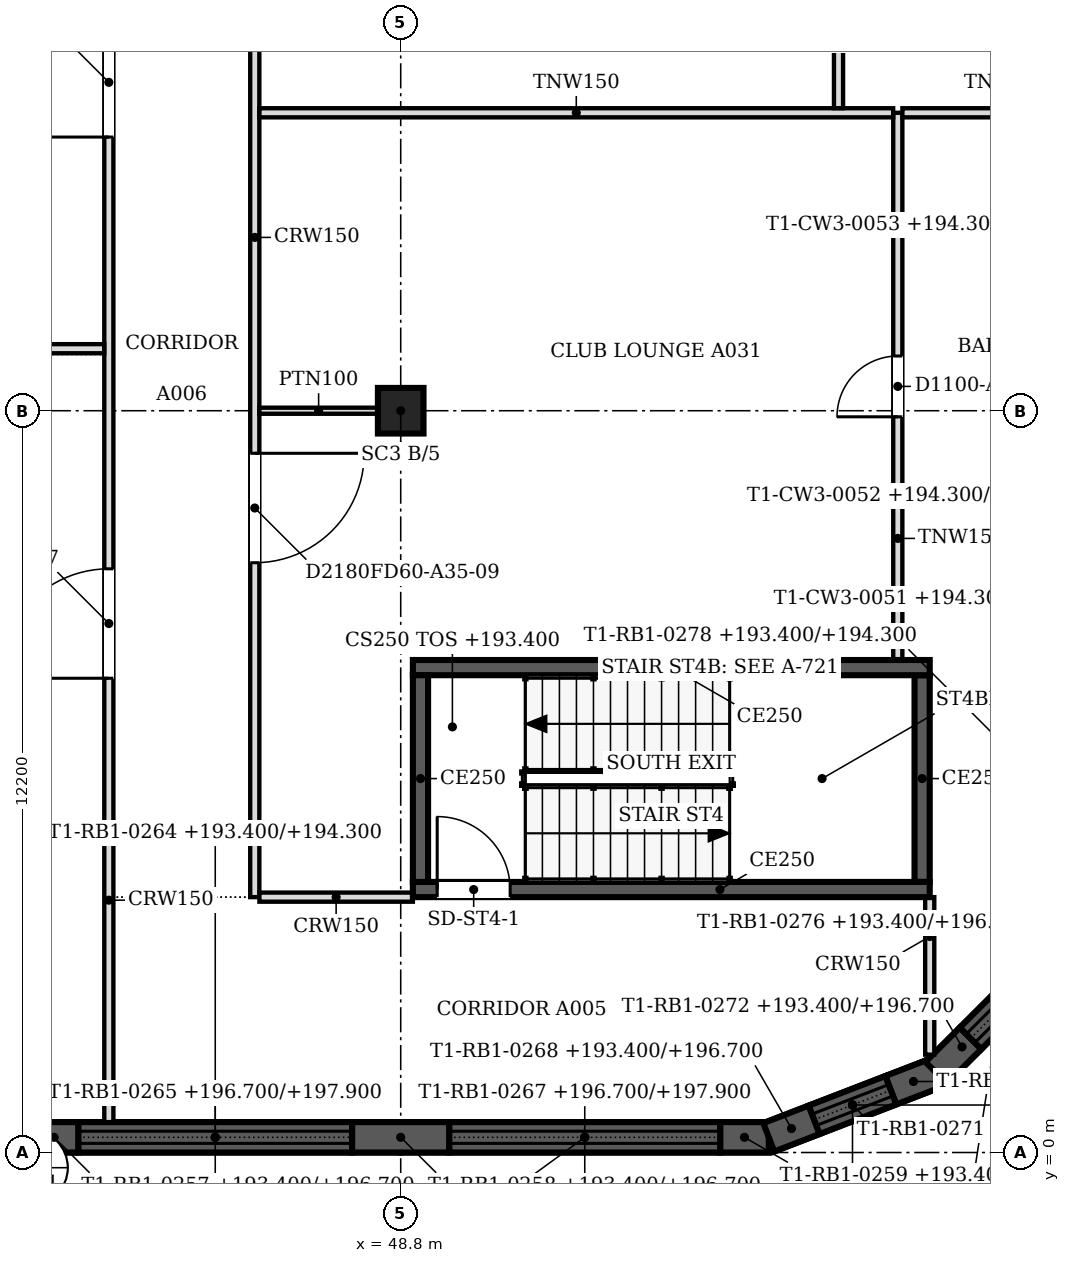
"""IFC4 building model, lengths in metres.
Left out: names, types, materials, properties, quantities, classifications, styles, units other than length and angle.
Written with IfcOpenShell. Run it as: python <this file> out.ifc"""

import sys

from ifc_helpers import new_model, si_unit, direction, frame, frame_2d, origin, origin_2d, place, context, subcontext, project, spatial, polyline, rectangle, outline, extrude, faceted_brep, source, transform, mapped, element, fill, save


model = new_model("IFC4")
c1 = context("Model", 3, precision=1e-05, world=origin(), true_north=direction((0.0, 1.0)))
c2 = subcontext(c1, "Body", "Model", "MODEL_VIEW")
j1 = project(units=[si_unit("LENGTHUNIT", "METRE"), si_unit("PLANEANGLEUNIT", "RADIAN")], contexts=[c1])
p1 = place(None, origin())
s1 = spatial("IfcSite", under=j1, at=p1, CompositionType="ELEMENT")
p2 = place(p1, origin())
s2 = spatial("IfcBuilding", under=s1, at=p2, CompositionType="ELEMENT")
p3 = place(p2, frame((0.0, 0.0, 193.4)))
s3 = spatial("IfcBuildingStorey", under=s2, at=p3, CompositionType="ELEMENT", Elevation=193.4)
p4 = place(p3, frame((48.8, 12.2, 0.0), z_axis=(0.0, 0.0, 1.0), x_axis=(1.0, 0.0, 0.0)))
e1 = element("IfcColumn", 1, at=p4, inside=s3, PredefinedType="COLUMN", context=c2, shape_type="SweptSolid", body=[
    extrude(rectangle(XDim=0.75, YDim=0.75, at=origin_2d()), origin(), (0.0, 0.0, 1.0), 4.3),
])
m1 = source(origin(), c2, "Body", "SweptSolid", [
    extrude(outline(polyline([(0.0, 0.0), (1.6, 0.0), (1.6, 3.3), (0.0, 3.3), (0.0, 0.0)])), frame((0.0, 0.25, 0.0), z_axis=(0.0, -1.0, 0.0), x_axis=(1.0, 0.0, 0.0)), (0.0, 0.0, 1.0), 0.5),
])
for number, where, z_axis, x_axis in (
    (2, (41.9, 0.25, 0.0), (0.0, 0.0, 1.0), (1.0, 0.0, 0.0)),
    (3, (48.0, 0.25, 0.0), (0.0, 0.0, 1.0), (1.0, 0.0, 0.0)),
):
    element("IfcWall", number, at=place(p3, frame(where, z_axis=z_axis, x_axis=x_axis)), inside=s3, PredefinedType="SOLIDWALL", context=c2, shape_type="MappedRepresentation", body=[
        mapped(m1, transform((0.0, 0.0, 0.0), scale=1.0)),
    ])
m2 = source(origin(), c2, "Body", "Brep", [
    faceted_brep([(0.0, -0.25, 0.0), (0.8, -0.25, 0.0), (0.8, -0.25, 3.3), (0.0, -0.25, 3.3), (0.0, 0.25, 3.3), (0.753, 0.25, 3.3), (0.753, 0.25, 0.0), (0.0, 0.25, 0.0), (0.8, -0.0, 0.0), (0.8, -0.0, 3.3)], [[[0, 1, 2, 3]], [[4, 5, 6, 7]], [[7, 6, 8, 1, 0]], [[9, 2, 1, 8]], [[5, 4, 3, 2, 9]], [[4, 7, 0, 3]], [[8, 6, 5, 9]]]),
])
p5 = place(p3, frame((54.053, 0.25, 0.0), z_axis=(0.0, 0.0, 1.0), x_axis=(1.0, 0.0, 0.0)))
e4 = element("IfcWall", 4, at=p5, inside=s3, PredefinedType="SOLIDWALL", context=c2, shape_type="MappedRepresentation", body=[
    mapped(m2, transform((0.0, 0.0, 0.0), scale=1.0)),
])
m3 = source(origin(), c2, "Body", "SweptSolid", [
    extrude(outline(polyline([(0.0, 0.0), (4.5, 0.0), (4.5, 0.9), (0.0, 0.9), (0.0, 0.0)])), frame((0.0, 0.25, 0.0), z_axis=(0.0, -1.0, 0.0), x_axis=(1.0, 0.0, 0.0)), (0.0, 0.0, 1.0), 0.5),
])
p6 = place(p3, frame((43.5, 0.25, 0.0), z_axis=(0.0, 0.0, 1.0), x_axis=(1.0, 0.0, 0.0)))
e5 = element("IfcWall", 5, at=p6, inside=s3, PredefinedType="SOLIDWALL", context=c2, shape_type="MappedRepresentation", body=[
    mapped(m3, transform((0.0, 0.0, 0.0), scale=1.0)),
])
m4 = source(origin(), c2, "Body", "SweptSolid", [
    extrude(outline(polyline([(0.0, 0.0), (6.1, 0.0), (6.1, 1.2), (0.0, 1.2), (0.0, 0.0)])), frame((0.0, 0.25, 0.0), z_axis=(0.0, -1.0, 0.0), x_axis=(1.0, 0.0, 0.0)), (0.0, 0.0, 1.0), 0.5),
])
p7 = place(p3, frame((42.7, 0.25, 3.3), z_axis=(0.0, 0.0, 1.0), x_axis=(1.0, 0.0, 0.0)))
e6 = element("IfcWall", 6, at=p7, inside=s3, PredefinedType="SOLIDWALL", context=c2, shape_type="MappedRepresentation", body=[
    mapped(m4, transform((0.0, 0.0, 0.0), scale=1.0)),
])
m5 = source(origin(), c2, "Body", "SweptSolid", [
    extrude(outline(polyline([(0.0, 0.0), (4.453, 0.0), (4.453, 0.9), (0.0, 0.9), (0.0, 0.0)])), frame((0.0, 0.25, 0.0), z_axis=(0.0, -1.0, 0.0), x_axis=(1.0, 0.0, 0.0)), (0.0, 0.0, 1.0), 0.5),
])
p8 = place(p3, frame((49.6, 0.25, 0.0), z_axis=(0.0, 0.0, 1.0), x_axis=(1.0, 0.0, 0.0)))
e7 = element("IfcWall", 7, at=p8, inside=s3, PredefinedType="SOLIDWALL", context=c2, shape_type="MappedRepresentation", body=[
    mapped(m5, transform((0.0, 0.0, 0.0), scale=1.0)),
])
m6 = source(origin(), c2, "Body", "Brep", [
    faceted_brep([(0.0, -0.25, 0.0), (6.053, -0.25, 0.0), (6.053, -0.25, 1.2), (0.0, -0.25, 1.2), (0.0, 0.25, 1.2), (6.007, 0.25, 1.2), (6.007, 0.25, 0.0), (0.0, 0.25, 0.0), (6.053, 0.0, 0.0), (6.053, 0.0, 1.2)], [[[0, 1, 2, 3]], [[4, 5, 6, 7]], [[7, 6, 8, 1, 0]], [[9, 2, 1, 8]], [[5, 4, 3, 2, 9]], [[4, 7, 0, 3]], [[8, 6, 5, 9]]]),
])
p9 = place(p3, frame((48.8, 0.25, 3.3), z_axis=(0.0, 0.0, 1.0), x_axis=(1.0, 0.0, 0.0)))
e8 = element("IfcWall", 8, at=p9, inside=s3, PredefinedType="SOLIDWALL", context=c2, shape_type="MappedRepresentation", body=[
    mapped(m6, transform((0.0, 0.0, 0.0), scale=1.0)),
])
m7 = source(origin(), c2, "Body", "Brep", [
    faceted_brep([(0.0, -0.25, 0.0), (0.8, -0.25, 0.0), (0.8, -0.25, 3.3), (0.0, -0.25, 3.3), (0.047, 0.25, 3.3), (0.8, 0.25, 3.3), (0.8, 0.25, 0.0), (0.047, 0.25, 0.0), (0.0, 0.0, 0.0), (0.0, 0.0, 3.3)], [[[0, 1, 2, 3]], [[4, 5, 6, 7]], [[7, 6, 1, 0, 8]], [[5, 4, 9, 3, 2]], [[8, 0, 3, 9]], [[7, 8, 9, 4]], [[1, 6, 5, 2]]]),
])
p10 = place(p3, frame((54.854, 0.25, 0.0), z_axis=(0.0, 0.0, 1.0), x_axis=(0.93301483327, 0.3598379092, 0.0)))
e9 = element("IfcWall", 9, at=p10, inside=s3, PredefinedType="SOLIDWALL", context=c2, shape_type="MappedRepresentation", body=[
    mapped(m7, transform((0.0, 0.0, 0.0), scale=1.0)),
])
m8 = source(origin(), c2, "Body", "Brep", [
    faceted_brep([(0.0, -0.25, 0.0), (0.8, -0.25, 0.0), (0.8, -0.25, 3.3), (0.0, -0.25, 3.3), (0.0, 0.25, 3.3), (0.747, 0.25, 3.3), (0.747, 0.25, 0.0), (0.0, 0.25, 0.0), (0.8, -0.0, 0.0), (0.8, -0.0, 3.3)], [[[0, 1, 2, 3]], [[4, 5, 6, 7]], [[7, 6, 8, 1, 0]], [[9, 2, 1, 8]], [[5, 4, 3, 2, 9]], [[4, 7, 0, 3]], [[8, 6, 5, 9]]]),
])
p11 = place(p3, frame((56.86, 1.024, 0.0), z_axis=(0.0, 0.0, 1.0), x_axis=(0.932912338632, 0.360103552367, 0.0)))
e10 = element("IfcWall", 10, at=p11, inside=s3, PredefinedType="SOLIDWALL", context=c2, shape_type="MappedRepresentation", body=[
    mapped(m8, transform((0.0, 0.0, 0.0), scale=1.0)),
])
m9 = source(origin(), c2, "Body", "SweptSolid", [
    extrude(outline(polyline([(0.0, 0.0), (1.351, 0.0), (1.351, 0.9), (0.0, 0.9), (0.0, 0.0)])), frame((0.0, 0.25, 0.0), z_axis=(0.0, -1.0, 0.0), x_axis=(1.0, 0.0, 0.0)), (0.0, 0.0, 1.0), 0.5),
])
p12 = place(p3, frame((55.6, 0.538, 0.0), z_axis=(0.0, 0.0, 1.0), x_axis=(0.932981713512, 0.359923772835, 0.0)))
e11 = element("IfcWall", 11, at=p12, inside=s3, PredefinedType="SOLIDWALL", context=c2, shape_type="MappedRepresentation", body=[
    mapped(m9, transform((0.0, 0.0, 0.0), scale=1.0)),
])
m10 = source(origin(), c2, "Body", "Brep", [
    faceted_brep([(0.0, -0.25, 0.0), (2.95, -0.25, 0.0), (2.95, -0.25, 1.2), (0.0, -0.25, 1.2), (0.047, 0.25, 1.2), (2.898, 0.25, 1.2), (2.898, 0.25, 0.0), (0.047, 0.25, 0.0), (2.95, 0.0, 0.0), (0.0, 0.0, 0.0), (2.95, 0.0, 1.2), (0.0, 0.0, 1.2)], [[[0, 1, 2, 3]], [[4, 5, 6, 7]], [[7, 6, 8, 1, 0, 9]], [[10, 2, 1, 8]], [[5, 4, 11, 3, 2, 10]], [[9, 0, 3, 11]], [[7, 9, 11, 4]], [[8, 6, 5, 10]]]),
])
p13 = place(p3, frame((54.854, 0.25, 3.3), z_axis=(0.0, 0.0, 1.0), x_axis=(0.932999673775, 0.359877213415, 0.0)))
e12 = element("IfcWall", 12, at=p13, inside=s3, PredefinedType="SOLIDWALL", context=c2, shape_type="MappedRepresentation", body=[
    mapped(m10, transform((0.0, 0.0, 0.0), scale=1.0)),
])
m11 = source(origin(), c2, "Body", "Brep", [
    faceted_brep([(0.0, -0.25, 0.0), (0.8, -0.25, 0.0), (0.8, -0.25, 3.3), (0.0, -0.25, 3.3), (0.053, 0.25, 3.3), (0.8, 0.25, 3.3), (0.8, 0.25, 0.0), (0.053, 0.25, 0.0), (0.0, 0.0, 0.0), (0.0, 0.0, 3.3)], [[[0, 1, 2, 3]], [[4, 5, 6, 7]], [[7, 6, 1, 0, 8]], [[5, 4, 9, 3, 2]], [[8, 0, 3, 9]], [[7, 8, 9, 4]], [[1, 6, 5, 2]]]),
])
p14 = place(p3, frame((57.606, 1.312, 0.0), z_axis=(0.0, 0.0, 1.0), x_axis=(0.707106781187, 0.707106781187, 0.0)))
e13 = element("IfcWall", 13, at=p14, inside=s3, PredefinedType="SOLIDWALL", context=c2, shape_type="MappedRepresentation", body=[
    mapped(m11, transform((0.0, 0.0, 0.0), scale=1.0)),
])
m12 = source(origin(), c2, "Body", "SweptSolid", [
    extrude(outline(polyline([(0.0, 0.0), (1.344, 0.0), (1.344, 0.9), (0.0, 0.9), (0.0, 0.0)])), frame((0.0, 0.25, 0.0), z_axis=(0.0, -1.0, 0.0), x_axis=(1.0, 0.0, 0.0)), (0.0, 0.0, 1.0), 0.5),
])
p15 = place(p3, frame((58.172, 1.878, 0.0), z_axis=(0.0, 0.0, 1.0), x_axis=(0.707106781187, 0.707106781187, 0.0)))
e14 = element("IfcWall", 14, at=p15, inside=s3, PredefinedType="SOLIDWALL", context=c2, shape_type="MappedRepresentation", body=[
    mapped(m12, transform((0.0, 0.0, 0.0), scale=1.0)),
])
m13 = source(origin(), c2, "Body", "Brep", [
    faceted_brep([(0.0, -0.25, 0.0), (2.944, -0.25, 0.0), (2.944, -0.25, 1.2), (0.0, -0.25, 1.2), (0.053, 0.25, 1.2), (2.891, 0.25, 1.2), (2.891, 0.25, 0.0), (0.053, 0.25, 0.0), (2.944, 0.0, 0.0), (0.0, 0.0, 0.0), (2.944, 0.0, 1.2), (0.0, 0.0, 1.2)], [[[0, 1, 2, 3]], [[4, 5, 6, 7]], [[7, 6, 8, 1, 0, 9]], [[10, 2, 1, 8]], [[5, 4, 11, 3, 2, 10]], [[9, 0, 3, 11]], [[7, 9, 11, 4]], [[8, 6, 5, 10]]]),
])
p16 = place(p3, frame((57.606, 1.312, 3.3), z_axis=(0.0, 0.0, 1.0), x_axis=(0.707106781187, 0.707106781187, 0.0)))
e15 = element("IfcWall", 15, at=p16, inside=s3, PredefinedType="SOLIDWALL", context=c2, shape_type="MappedRepresentation", body=[
    mapped(m13, transform((0.0, 0.0, 0.0), scale=1.0)),
])
p17 = place(p3, frame((57.5, 4.325, 0.0), z_axis=(0.0, 0.0, 1.0), x_axis=(-1.0, 0.0, 0.0)))
e16 = element("IfcWall", 16, at=p17, inside=s3, PredefinedType="SOLIDWALL", context=c2, shape_type="SweptSolid", body=[
    extrude(rectangle(XDim=8.5, YDim=0.25, at=frame_2d((4.25, 0.0))), origin(), (0.0, 0.0, 1.0), 4.5),
])
m14 = source(origin(), c2, "Body", "SweptSolid", [
    extrude(rectangle(XDim=1.2, YDim=2.1, at=frame_2d((0.6, 1.05))), frame((0.0, 0.135, 0.0), z_axis=(0.0, -1.0, 0.0), x_axis=(1.0, 0.0, 0.0)), (0.0, 0.0, 1.0), 0.27),
])
p18 = place(p17, frame((6.9, 0.0, 0.0)))
e17 = element("IfcOpeningElement", 17, at=p18, cuts=e16, PredefinedType="OPENING", context=c2, shape_type="MappedRepresentation", body=[
    mapped(m14, transform((0.0, 0.0, 0.0), scale=1.0)),
])
p19 = place(p3, frame((49.125, 4.45, 0.0), z_axis=(0.0, 0.0, 1.0), x_axis=(0.0, 1.0, 0.0)))
e18 = element("IfcWall", 18, at=p19, inside=s3, PredefinedType="SOLIDWALL", context=c2, shape_type="SweptSolid", body=[
    extrude(rectangle(XDim=3.4, YDim=0.25, at=frame_2d((1.7, 0.0))), origin(), (0.0, 0.0, 1.0), 4.5),
])
p20 = place(p3, frame((49.0, 7.975, 0.0), z_axis=(0.0, 0.0, 1.0), x_axis=(1.0, 0.0, 0.0)))
e19 = element("IfcWall", 19, at=p20, inside=s3, PredefinedType="SOLIDWALL", context=c2, shape_type="SweptSolid", body=[
    extrude(rectangle(XDim=8.5, YDim=0.25, at=frame_2d((4.25, 0.0))), origin(), (0.0, 0.0, 1.0), 4.5),
])
p21 = place(p3, frame((57.375, 7.85, 0.0), z_axis=(0.0, 0.0, 1.0), x_axis=(0.0, -1.0, 0.0)))
e20 = element("IfcWall", 20, at=p21, inside=s3, PredefinedType="SOLIDWALL", context=c2, shape_type="SweptSolid", body=[
    extrude(rectangle(XDim=3.4, YDim=0.25, at=frame_2d((1.7, 0.0))), origin(), (0.0, 0.0, 1.0), 4.5),
])
p22 = place(p3, frame((44.0, 0.5, 0.0), z_axis=(0.0, 0.0, 1.0), x_axis=(0.0, 1.0, 0.0)))
e21 = element("IfcWall", 21, at=p22, inside=s3, PredefinedType="PARTITIONING", context=c2, shape_type="SweptSolid", body=[
    extrude(rectangle(XDim=21.424, YDim=0.15, at=frame_2d((10.712, 0.0))), origin(), (0.0, 0.0, 1.0), 3.767),
])
m15 = source(origin(), c2, "Body", "SweptSolid", [
    extrude(rectangle(XDim=1.8, YDim=2.1, at=frame_2d((0.9, 1.05))), frame((0.0, 0.085, 0.0), z_axis=(0.0, -1.0, 0.0), x_axis=(1.0, 0.0, 0.0)), (0.0, 0.0, 1.0), 0.17),
])
p23 = place(p22, frame((16.201, 0.0, 0.0)))
e22 = element("IfcOpeningElement", 22, at=p23, cuts=e21, PredefinedType="OPENING", context=c2, shape_type="MappedRepresentation", body=[
    mapped(m15, transform((0.0, 0.0, 0.0), scale=1.0)),
])
p24 = place(p22, frame((7.3, 0.0, 0.0)))
e23 = element("IfcOpeningElement", 23, at=p24, cuts=e21, PredefinedType="OPENING", context=c2, shape_type="MappedRepresentation", body=[
    mapped(m15, transform((0.0, 0.0, 0.0), scale=1.0)),
])
p25 = place(p3, frame((57.5, 1.609, 0.0), z_axis=(0.0, 0.0, 1.0), x_axis=(0.0, 1.0, 0.0)))
e24 = element("IfcWall", 24, at=p25, inside=s3, PredefinedType="PARTITIONING", context=c2, shape_type="SweptSolid", body=[
    extrude(rectangle(XDim=2.591, YDim=0.15, at=frame_2d((1.295, 0.0))), origin(), (0.0, 0.0, 1.0), 3.767),
])
p26 = place(p3, frame((46.4, 21.924, 0.0), z_axis=(0.0, 0.0, 1.0), x_axis=(0.0, -1.0, 0.0)))
e25 = element("IfcWall", 25, at=p26, inside=s3, PredefinedType="PARTITIONING", context=c2, shape_type="SweptSolid", body=[
    extrude(rectangle(XDim=17.724, YDim=0.15, at=frame_2d((8.862, 0.0))), origin(), (0.0, 0.0, 1.0), 3.767),
])
p27 = place(p26, frame((1.523, 0.0, 0.0)))
e26 = element("IfcOpeningElement", 26, at=p27, cuts=e25, PredefinedType="OPENING", context=c2, shape_type="MappedRepresentation", body=[
    mapped(m15, transform((0.0, 0.0, 0.0), scale=1.0)),
])
p28 = place(p26, frame((10.424, 0.0, 0.0)))
e27 = element("IfcOpeningElement", 27, at=p28, cuts=e25, PredefinedType="OPENING", context=c2, shape_type="MappedRepresentation", body=[
    mapped(m15, transform((0.0, 0.0, 0.0), scale=1.0)),
])
p29 = place(p3, frame((46.476, 4.2, 0.0), z_axis=(0.0, 0.0, 1.0), x_axis=(1.0, 0.0, 0.0)))
e28 = element("IfcWall", 28, at=p29, inside=s3, PredefinedType="PARTITIONING", context=c2, shape_type="SweptSolid", body=[
    extrude(rectangle(XDim=2.524, YDim=0.15, at=frame_2d((1.262, 0.0))), origin(), (0.0, 0.0, 1.0), 3.767),
])
p30 = place(p3, frame((56.975, 17.1, 0.0), z_axis=(0.0, 0.0, 1.0), x_axis=(0.0, -1.0, 0.0)))
e29 = element("IfcWall", 29, at=p30, inside=s3, PredefinedType="PARTITIONING", context=c2, shape_type="SweptSolid", body=[
    extrude(rectangle(XDim=9.0, YDim=0.15, at=frame_2d((4.5, 0.0))), origin(), (0.0, 0.0, 1.0), 3.767),
])
m16 = source(origin(), c2, "Body", "SweptSolid", [
    extrude(rectangle(XDim=1.0, YDim=2.1, at=frame_2d((0.5, 1.05))), frame((0.0, 0.085, 0.0), z_axis=(0.0, -1.0, 0.0), x_axis=(1.0, 0.0, 0.0)), (0.0, 0.0, 1.0), 0.17),
])
p31 = place(p30, frame((4.0, 0.0, 0.0)))
e30 = element("IfcOpeningElement", 30, at=p31, cuts=e29, PredefinedType="OPENING", context=c2, shape_type="MappedRepresentation", body=[
    mapped(m16, transform((0.0, 0.0, 0.0), scale=1.0)),
])
p32 = place(p3, frame((48.425, 12.2, 0.0), z_axis=(0.0, 0.0, 1.0), x_axis=(-1.0, 0.0, 0.0)))
e31 = element("IfcWall", 31, at=p32, inside=s3, PredefinedType="PARTITIONING", context=c2, shape_type="SweptSolid", body=[
    extrude(rectangle(XDim=1.95, YDim=0.1, at=frame_2d((0.975, 0.0))), origin(), (0.0, 0.0, 1.0), 3.767),
])
p33 = place(p3, frame((24.55, 13.22, 0.0), z_axis=(0.0, 0.0, 1.0), x_axis=(1.0, 0.0, 0.0)))
e32 = element("IfcWall", 32, at=p33, inside=s3, PredefinedType="PARTITIONING", context=c2, shape_type="SweptSolid", body=[
    extrude(rectangle(XDim=19.374, YDim=0.15, at=frame_2d((9.687, 0.0))), origin(), (0.0, 0.0, 1.0), 3.767),
])
p34 = place(p3, frame((46.476, 17.1, 0.0), z_axis=(0.0, 0.0, 1.0), x_axis=(1.0, 0.0, 0.0)))
e33 = element("IfcWall", 33, at=p34, inside=s3, PredefinedType="PARTITIONING", context=c2, shape_type="SweptSolid", body=[
    extrude(rectangle(XDim=10.423, YDim=0.15, at=frame_2d((5.211, 0.0))), origin(), (0.0, 0.0, 1.0), 3.767),
])
p35 = place(p3, frame((57.051, 17.1, 0.0), z_axis=(0.0, 0.0, 1.0), x_axis=(1.0, 0.0, 0.0)))
e34 = element("IfcWall", 34, at=p35, inside=s3, PredefinedType="PARTITIONING", context=c2, shape_type="SweptSolid", body=[
    extrude(rectangle(XDim=3.449, YDim=0.15, at=frame_2d((1.725, 0.0))), origin(), (0.0, 0.0, 1.0), 3.767),
])
p36 = place(p3, frame((56.0, 21.924, 0.0), z_axis=(0.0, 0.0, 1.0), x_axis=(0.0, -1.0, 0.0)))
e35 = element("IfcWall", 35, at=p36, inside=s3, PredefinedType="PARTITIONING", context=c2, shape_type="SweptSolid", body=[
    extrude(rectangle(XDim=4.748, YDim=0.15, at=frame_2d((2.374, 0.0))), origin(), (0.0, 0.0, 1.0), 3.767),
])
m17 = source(origin(), c2, "Body", "SweptSolid", [
    extrude(rectangle(XDim=0.9, YDim=2.1, at=frame_2d((0.45, 1.05))), frame((0.0, 0.085, 0.0), z_axis=(0.0, -1.0, 0.0), x_axis=(1.0, 0.0, 0.0)), (0.0, 0.0, 1.0), 0.17),
])
p37 = place(p36, frame((1.948, 0.0, 0.0)))
e36 = element("IfcOpeningElement", 36, at=p37, cuts=e35, PredefinedType="OPENING", context=c2, shape_type="MappedRepresentation", body=[
    mapped(m17, transform((0.0, 0.0, 0.0), scale=1.0)),
])
m18 = source(origin(), c2, "Body", "SweptSolid", [
    extrude(rectangle(XDim=1.2, YDim=2.1, at=frame_2d((0.6, 1.05))), frame((0.0, 0.025, 0.0), z_axis=(0.0, -1.0, 0.0), x_axis=(1.0, 0.0, 0.0)), (0.0, 0.0, 1.0), 0.05),
])
p38 = place(p18, origin())
e37 = element("IfcDoor", 37, at=p38, inside=s3, OperationType="SINGLE_SWING_RIGHT", PredefinedType="DOOR", context=c2, shape_type="MappedRepresentation", body=[
    mapped(m18, transform((0.0, 0.0, 0.0), scale=1.0)),
])
fill(e17, e37)
m19 = source(origin(), c2, "Body", "SweptSolid", [
    extrude(rectangle(XDim=1.8, YDim=2.1, at=frame_2d((0.9, 1.05))), frame((0.0, 0.025, 0.0), z_axis=(0.0, -1.0, 0.0), x_axis=(1.0, 0.0, 0.0)), (0.0, 0.0, 1.0), 0.05),
])
p39 = place(p23, origin())
e38 = element("IfcDoor", 38, at=p39, inside=s3, OperationType="DOUBLE_DOOR_SINGLE_SWING", PredefinedType="DOOR", context=c2, shape_type="MappedRepresentation", body=[
    mapped(m19, transform((0.0, 0.0, 0.0), scale=1.0)),
])
fill(e22, e38)
p40 = place(p24, origin())
e39 = element("IfcDoor", 39, at=p40, inside=s3, OperationType="DOUBLE_DOOR_SINGLE_SWING", PredefinedType="DOOR", context=c2, shape_type="MappedRepresentation", body=[
    mapped(m19, transform((0.0, 0.0, 0.0), scale=1.0)),
])
fill(e23, e39)
m20 = source(origin(), c2, "Body", "SweptSolid", [
    extrude(rectangle(XDim=1.0, YDim=2.1, at=frame_2d((0.5, 1.05))), frame((0.0, 0.025, 0.0), z_axis=(0.0, -1.0, 0.0), x_axis=(1.0, 0.0, 0.0)), (0.0, 0.0, 1.0), 0.05),
])
p41 = place(p31, origin())
e40 = element("IfcDoor", 40, at=p41, inside=s3, OperationType="SINGLE_SWING_RIGHT", PredefinedType="DOOR", context=c2, shape_type="MappedRepresentation", body=[
    mapped(m20, transform((0.0, 0.0, 0.0), scale=1.0)),
])
fill(e30, e40)
p42 = place(p28, origin())
e41 = element("IfcDoor", 41, at=p42, inside=s3, OperationType="DOUBLE_DOOR_SINGLE_SWING", PredefinedType="DOOR", context=c2, shape_type="MappedRepresentation", body=[
    mapped(m19, transform((0.0, 0.0, 0.0), scale=1.0)),
])
fill(e27, e41)
save(model, sys.argv[1])
